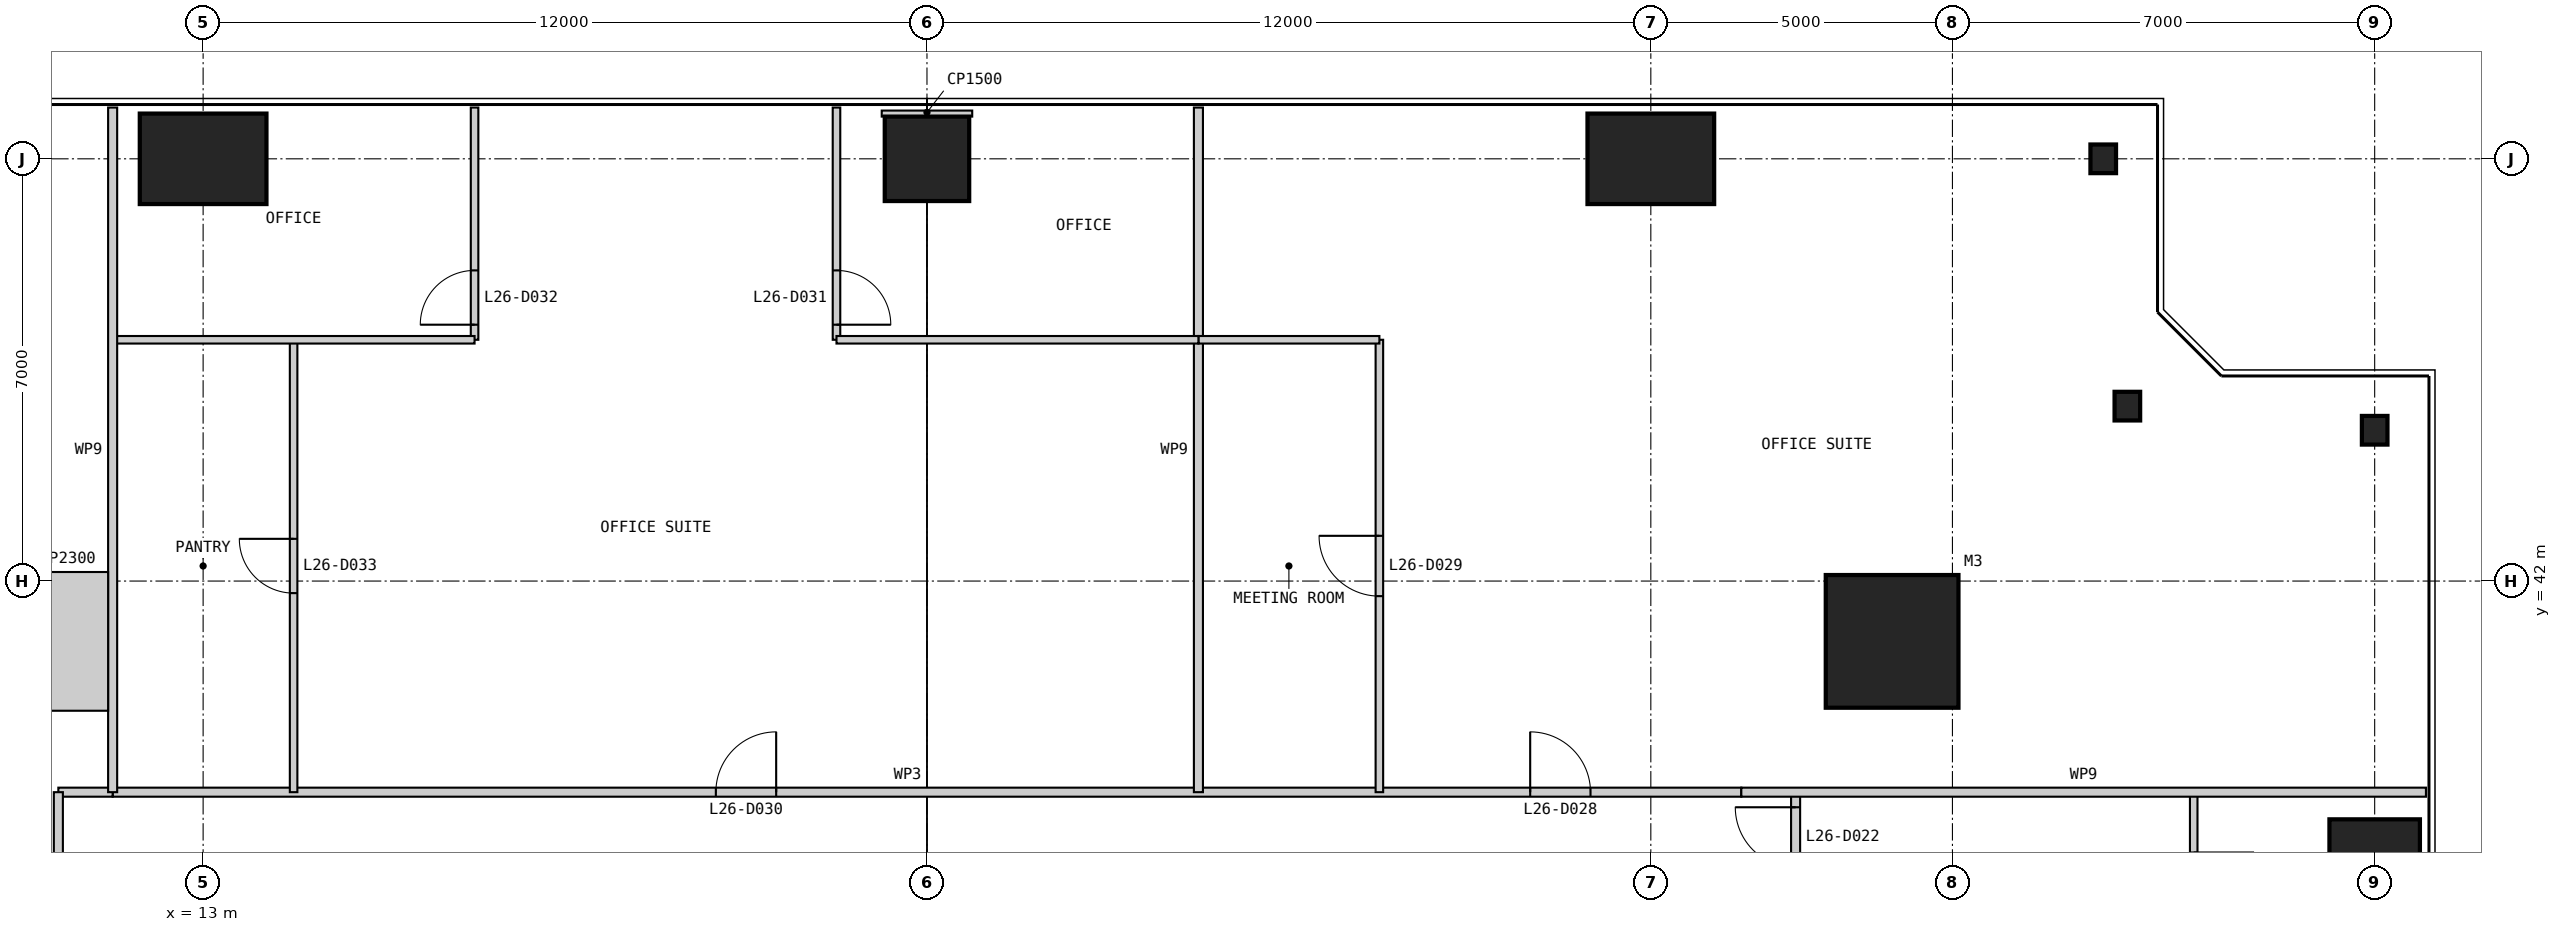
"""IFC4 building model, lengths in metres.
Left out: names, types, materials, properties, quantities, classifications, styles, units other than length and angle.
Written with IfcOpenShell. Run it as: python <this file> out.ifc"""

import sys

from ifc_helpers import new_model, si_unit, direction, frame, frame_2d, origin, origin_2d, place, context, subcontext, project, spatial, rectangle, i_section, extrude, element, fill, save


model = new_model("IFC4")
c1 = context("Model", 3, precision=1e-05, world=origin(), true_north=direction((0.0, 1.0)))
c2 = subcontext(c1, "Body", "Model", "MODEL_VIEW")
j1 = project(units=[si_unit("LENGTHUNIT", "METRE"), si_unit("PLANEANGLEUNIT", "RADIAN")], contexts=[c1])
p1 = place(None, origin())
s1 = spatial("IfcSite", under=j1, at=p1, CompositionType="ELEMENT")
p2 = place(p1, origin())
s2 = spatial("IfcBuilding", under=s1, at=p2, CompositionType="ELEMENT")
p3 = place(p2, frame((0.0, 0.0, 114.4)))
s3 = spatial("IfcBuildingStorey", under=s2, at=p3, CompositionType="ELEMENT", Elevation=114.4)
p4 = place(p3, frame((41.0, 41.0, 0.0), z_axis=(0.0, 0.0, 1.0), x_axis=(1.0, 0.0, 0.0)))
e1 = element("IfcColumn", 1, at=p4, inside=s3, PredefinedType="COLUMN", context=c2, shape_type="SweptSolid", body=[
    extrude(rectangle(XDim=2.2, YDim=2.2, at=origin_2d()), origin(), (0.0, 0.0, 1.0), 4.0),
])
p5 = place(p3, frame((49.0, 37.0, 0.0), z_axis=(0.0, 0.0, 1.0), x_axis=(1.0, 0.0, 0.0)))
e2 = element("IfcColumn", 2, at=p5, inside=s3, PredefinedType="COLUMN", context=c2, shape_type="SweptSolid", body=[
    extrude(rectangle(XDim=1.5, YDim=2.1, at=origin_2d()), origin(), (0.0, 0.0, 1.0), 4.0),
])
for number, where, z_axis, x_axis in (
    (3, (49.0, 44.5, 0.0), (0.0, 0.0, 1.0), (1.0, 0.0, 0.0)),
    (4, (44.9, 44.9, 0.0), (0.0, 0.0, 1.0), (1.0, 0.0, 0.0)),
    (5, (44.5, 49.0, 0.0), (0.0, 0.0, 1.0), (1.0, 0.0, 0.0)),
):
    element("IfcColumn", number, at=place(p3, frame(where, z_axis=z_axis, x_axis=x_axis)), inside=s3, PredefinedType="COLUMN", context=c2, shape_type="SweptSolid", body=[
        extrude(i_section(OverallWidth=0.424, OverallDepth=0.475, WebThickness=0.048, FlangeThickness=0.077, at=origin_2d()), origin(), (0.0, 0.0, 1.0), 4.0),
    ])
p6 = place(p3, frame((37.0, 49.0, 0.0), z_axis=(0.0, 0.0, 1.0), x_axis=(1.0, 0.0, 0.0)))
e6 = element("IfcColumn", 6, at=p6, inside=s3, PredefinedType="COLUMN", context=c2, shape_type="SweptSolid", body=[
    extrude(rectangle(XDim=2.1, YDim=1.5, at=origin_2d()), origin(), (0.0, 0.0, 1.0), 4.0),
])
p7 = place(p3, frame((25.0, 49.0, 0.0), z_axis=(0.0, 0.0, 1.0), x_axis=(1.0, 0.0, 0.0)))
e7 = element("IfcColumn", 7, at=p7, inside=s3, PredefinedType="COLUMN", context=c2, shape_type="SweptSolid", body=[
    extrude(rectangle(XDim=1.4, YDim=1.4, at=origin_2d()), origin(), (0.0, 0.0, 1.0), 4.0),
])
p8 = place(p3, frame((13.0, 49.0, 0.0), z_axis=(0.0, 0.0, 1.0), x_axis=(1.0, 0.0, 0.0)))
e8 = element("IfcColumn", 8, at=p8, inside=s3, PredefinedType="COLUMN", context=c2, shape_type="SweptSolid", body=[
    extrude(rectangle(XDim=2.1, YDim=1.5, at=origin_2d()), origin(), (0.0, 0.0, 1.0), 4.0),
])
p9 = place(p3, frame((39.4, 11.5, 0.0), z_axis=(0.0, 0.0, 1.0), x_axis=(0.0, 1.0, 0.0)))
e9 = element("IfcWall", 9, at=p9, inside=s3, PredefinedType="PARTITIONING", context=c2, shape_type="SweptSolid", body=[
    extrude(rectangle(XDim=27.0, YDim=0.15, at=frame_2d((13.5, 0.0))), origin(), (0.0, 0.0, 1.0), 3.85),
])
p10 = place(p9, frame((3.25, 0.0, 0.0)))
e10 = element("IfcOpeningElement", 10, at=p10, cuts=e9, PredefinedType="OPENING", context=c2, shape_type="SweptSolid", body=[
    extrude(rectangle(XDim=1.0, YDim=2.2, at=frame_2d((0.5, 1.1))), frame((0.0, 0.085, 0.0), z_axis=(0.0, -1.0, 0.0), x_axis=(1.0, 0.0, 0.0)), (0.0, 0.0, 1.0), 0.17),
])
p11 = place(p9, frame((25.75, 0.0, 0.0)))
e11 = element("IfcOpeningElement", 11, at=p11, cuts=e9, PredefinedType="OPENING", context=c2, shape_type="SweptSolid", body=[
    extrude(rectangle(XDim=1.0, YDim=2.2, at=frame_2d((0.5, 1.1))), frame((0.0, 0.085, 0.0), z_axis=(0.0, -1.0, 0.0), x_axis=(1.0, 0.0, 0.0)), (0.0, 0.0, 1.0), 0.17),
])
p12 = place(p9, frame((1.75, 0.0, 0.0)))
e12 = element("IfcOpeningElement", 12, at=p12, cuts=e9, PredefinedType="OPENING", context=c2, shape_type="SweptSolid", body=[
    extrude(rectangle(XDim=1.0, YDim=2.2, at=frame_2d((0.5, 1.1))), frame((0.0, 0.085, 0.0), z_axis=(0.0, -1.0, 0.0), x_axis=(1.0, 0.0, 0.0)), (0.0, 0.0, 1.0), 0.17),
])
p13 = place(p3, frame((46.0, 14.5, 0.0), z_axis=(0.0, 0.0, 1.0), x_axis=(0.0, 1.0, 0.0)))
e13 = element("IfcWall", 13, at=p13, inside=s3, PredefinedType="PARTITIONING", context=c2, shape_type="SweptSolid", body=[
    extrude(rectangle(XDim=24.0, YDim=0.125, at=frame_2d((12.0, 0.0))), origin(), (0.0, 0.0, 1.0), 3.238),
])
p14 = place(p13, frame((4.75, 0.0, 0.0)))
e14 = element("IfcOpeningElement", 14, at=p14, cuts=e13, PredefinedType="OPENING", context=c2, shape_type="SweptSolid", body=[
    extrude(rectangle(XDim=1.0, YDim=2.2, at=frame_2d((0.5, 1.1))), frame((0.0, 0.073, 0.0), z_axis=(0.0, -1.0, 0.0), x_axis=(1.0, 0.0, 0.0)), (0.0, 0.0, 1.0), 0.145),
])
p15 = place(p13, frame((10.0, 0.0, 0.0)))
e15 = element("IfcOpeningElement", 15, at=p15, cuts=e13, PredefinedType="OPENING", context=c2, shape_type="SweptSolid", body=[
    extrude(rectangle(XDim=1.0, YDim=2.2, at=frame_2d((0.5, 1.1))), frame((0.0, 0.073, 0.0), z_axis=(0.0, -1.0, 0.0), x_axis=(1.0, 0.0, 0.0)), (0.0, 0.0, 1.0), 0.145),
])
p16 = place(p13, frame((16.0, 0.0, 0.0)))
e16 = element("IfcOpeningElement", 16, at=p16, cuts=e13, PredefinedType="OPENING", context=c2, shape_type="SweptSolid", body=[
    extrude(rectangle(XDim=1.0, YDim=2.2, at=frame_2d((0.5, 1.1))), frame((0.0, 0.073, 0.0), z_axis=(0.0, -1.0, 0.0), x_axis=(1.0, 0.0, 0.0)), (0.0, 0.0, 1.0), 0.145),
])
p17 = place(p13, frame((22.0, 0.0, 0.0)))
e17 = element("IfcOpeningElement", 17, at=p17, cuts=e13, PredefinedType="OPENING", context=c2, shape_type="SweptSolid", body=[
    extrude(rectangle(XDim=1.0, YDim=2.2, at=frame_2d((0.5, 1.1))), frame((0.0, 0.073, 0.0), z_axis=(0.0, -1.0, 0.0), x_axis=(1.0, 0.0, 0.0)), (0.0, 0.0, 1.0), 0.145),
])
p18 = place(p3, frame((38.5, 38.5, 0.0), z_axis=(0.0, 0.0, 1.0), x_axis=(-1.0, 0.0, 0.0)))
e18 = element("IfcWall", 18, at=p18, inside=s3, PredefinedType="PARTITIONING", context=c2, shape_type="SweptSolid", body=[
    extrude(rectangle(XDim=27.0, YDim=0.15, at=frame_2d((13.5, 0.0))), origin(), (0.0, 0.0, 1.0), 3.85),
])
p19 = place(p18, frame((2.5, 0.0, 0.0)))
e19 = element("IfcOpeningElement", 19, at=p19, cuts=e18, PredefinedType="OPENING", context=c2, shape_type="SweptSolid", body=[
    extrude(rectangle(XDim=1.0, YDim=2.2, at=frame_2d((0.5, 1.1))), frame((0.0, 0.085, 0.0), z_axis=(0.0, -1.0, 0.0), x_axis=(1.0, 0.0, 0.0)), (0.0, 0.0, 1.0), 0.17),
])
p20 = place(p18, frame((16.0, 0.0, 0.0)))
e20 = element("IfcOpeningElement", 20, at=p20, cuts=e18, PredefinedType="OPENING", context=c2, shape_type="SweptSolid", body=[
    extrude(rectangle(XDim=1.0, YDim=2.2, at=frame_2d((0.5, 1.1))), frame((0.0, 0.085, 0.0), z_axis=(0.0, -1.0, 0.0), x_axis=(1.0, 0.0, 0.0)), (0.0, 0.0, 1.0), 0.17),
])
p21 = place(p3, frame((49.85, 38.5, 0.0), z_axis=(0.0, 0.0, 1.0), x_axis=(-1.0, 0.0, 0.0)))
e21 = element("IfcWall", 21, at=p21, inside=s3, PredefinedType="PARTITIONING", context=c2, shape_type="SweptSolid", body=[
    extrude(rectangle(XDim=11.35, YDim=0.15, at=frame_2d((5.675, 0.0))), origin(), (0.0, 0.0, 1.0), 3.85),
])
p22 = place(p3, frame((32.5, 46.0, 0.0), z_axis=(0.0, 0.0, 1.0), x_axis=(0.0, -1.0, 0.0)))
e22 = element("IfcWall", 22, at=p22, inside=s3, PredefinedType="PARTITIONING", context=c2, shape_type="SweptSolid", body=[
    extrude(rectangle(XDim=7.5, YDim=0.125, at=frame_2d((3.75, 0.0))), origin(), (0.0, 0.0, 1.0), 3.85),
])
p23 = place(p22, frame((3.25, 0.0, 0.0)))
e23 = element("IfcOpeningElement", 23, at=p23, cuts=e22, PredefinedType="OPENING", context=c2, shape_type="SweptSolid", body=[
    extrude(rectangle(XDim=1.0, YDim=2.2, at=frame_2d((0.5, 1.1))), frame((0.0, 0.073, 0.0), z_axis=(0.0, -1.0, 0.0), x_axis=(1.0, 0.0, 0.0)), (0.0, 0.0, 1.0), 0.145),
])
p24 = place(p3, frame((29.5, 49.85, 0.0), z_axis=(0.0, 0.0, 1.0), x_axis=(0.0, -1.0, 0.0)))
e24 = element("IfcWall", 24, at=p24, inside=s3, PredefinedType="PARTITIONING", context=c2, shape_type="SweptSolid", body=[
    extrude(rectangle(XDim=11.35, YDim=0.15, at=frame_2d((5.675, 0.0))), origin(), (0.0, 0.0, 1.0), 3.85),
])
p25 = place(p3, frame((23.5, 49.85, 0.0), z_axis=(0.0, 0.0, 1.0), x_axis=(0.0, -1.0, 0.0)))
e25 = element("IfcWall", 25, at=p25, inside=s3, PredefinedType="PARTITIONING", context=c2, shape_type="SweptSolid", body=[
    extrude(rectangle(XDim=3.85, YDim=0.125, at=frame_2d((1.925, 0.0))), origin(), (0.0, 0.0, 1.0), 3.85),
])
p26 = place(p25, frame((2.7, 0.0, 0.0)))
e26 = element("IfcOpeningElement", 26, at=p26, cuts=e25, PredefinedType="OPENING", context=c2, shape_type="SweptSolid", body=[
    extrude(rectangle(XDim=0.9, YDim=2.2, at=frame_2d((0.45, 1.1))), frame((0.0, 0.073, 0.0), z_axis=(0.0, -1.0, 0.0), x_axis=(1.0, 0.0, 0.0)), (0.0, 0.0, 1.0), 0.145),
])
p27 = place(p3, frame((17.5, 49.85, 0.0), z_axis=(0.0, 0.0, 1.0), x_axis=(0.0, -1.0, 0.0)))
e27 = element("IfcWall", 27, at=p27, inside=s3, PredefinedType="PARTITIONING", context=c2, shape_type="SweptSolid", body=[
    extrude(rectangle(XDim=3.85, YDim=0.125, at=frame_2d((1.925, 0.0))), origin(), (0.0, 0.0, 1.0), 3.85),
])
p28 = place(p27, frame((2.7, 0.0, 0.0)))
e28 = element("IfcOpeningElement", 28, at=p28, cuts=e27, PredefinedType="OPENING", context=c2, shape_type="SweptSolid", body=[
    extrude(rectangle(XDim=0.9, YDim=2.2, at=frame_2d((0.45, 1.1))), frame((0.0, 0.073, 0.0), z_axis=(0.0, -1.0, 0.0), x_axis=(1.0, 0.0, 0.0)), (0.0, 0.0, 1.0), 0.145),
])
p29 = place(p3, frame((14.5, 46.0, 0.0), z_axis=(0.0, 0.0, 1.0), x_axis=(0.0, -1.0, 0.0)))
e29 = element("IfcWall", 29, at=p29, inside=s3, PredefinedType="PARTITIONING", context=c2, shape_type="SweptSolid", body=[
    extrude(rectangle(XDim=7.5, YDim=0.125, at=frame_2d((3.75, 0.0))), origin(), (0.0, 0.0, 1.0), 3.85),
])
p30 = place(p29, frame((3.3, 0.0, 0.0)))
e30 = element("IfcOpeningElement", 30, at=p30, cuts=e29, PredefinedType="OPENING", context=c2, shape_type="SweptSolid", body=[
    extrude(rectangle(XDim=0.9, YDim=2.2, at=frame_2d((0.45, 1.1))), frame((0.0, 0.073, 0.0), z_axis=(0.0, -1.0, 0.0), x_axis=(1.0, 0.0, 0.0)), (0.0, 0.0, 1.0), 0.145),
])
p31 = place(p3, frame((32.5, 46.0, 0.0), z_axis=(0.0, 0.0, 1.0), x_axis=(-1.0, 0.0, 0.0)))
e31 = element("IfcWall", 31, at=p31, inside=s3, PredefinedType="PARTITIONING", context=c2, shape_type="SweptSolid", body=[
    extrude(rectangle(XDim=3.0, YDim=0.125, at=frame_2d((1.5, 0.0))), origin(), (0.0, 0.0, 1.0), 3.85),
])
for number, where, z_axis, x_axis in (
    (32, (29.5, 46.0, 0.0), (0.0, 0.0, 1.0), (-1.0, 0.0, 0.0)),
    (33, (17.5, 46.0, 0.0), (0.0, 0.0, 1.0), (-1.0, 0.0, 0.0)),
):
    element("IfcWall", number, at=place(p3, frame(where, z_axis=z_axis, x_axis=x_axis)), inside=s3, PredefinedType="PARTITIONING", context=c2, shape_type="SweptSolid", body=[
        extrude(rectangle(XDim=6.0, YDim=0.125, at=frame_2d((3.0, 0.0))), origin(), (0.0, 0.0, 1.0), 3.85),
    ])
p32 = place(p3, frame((11.5, 38.5, 0.0), z_axis=(0.0, 0.0, 1.0), x_axis=(-1.0, 0.0, 0.0)))
e34 = element("IfcWall", 34, at=p32, inside=s3, PredefinedType="PARTITIONING", context=c2, shape_type="SweptSolid", body=[
    extrude(rectangle(XDim=0.9, YDim=0.15, at=frame_2d((0.45, 0.0))), origin(), (0.0, 0.0, 1.0), 3.85),
])
p33 = place(p3, frame((10.6, 38.5, 0.0), z_axis=(0.0, 0.0, 1.0), x_axis=(0.0, -1.0, 0.0)))
e35 = element("IfcWall", 35, at=p33, inside=s3, PredefinedType="PARTITIONING", context=c2, shape_type="SweptSolid", body=[
    extrude(rectangle(XDim=27.0, YDim=0.15, at=frame_2d((13.5, 0.0))), origin(), (0.0, 0.0, 1.0), 3.85),
])
p34 = place(p33, frame((3.25, 0.0, 0.0)))
e36 = element("IfcOpeningElement", 36, at=p34, cuts=e35, PredefinedType="OPENING", context=c2, shape_type="SweptSolid", body=[
    extrude(rectangle(XDim=1.0, YDim=2.2, at=frame_2d((0.5, 1.1))), frame((0.0, 0.085, 0.0), z_axis=(0.0, -1.0, 0.0), x_axis=(1.0, 0.0, 0.0)), (0.0, 0.0, 1.0), 0.17),
])
p35 = place(p33, frame((22.75, 0.0, 0.0)))
e37 = element("IfcOpeningElement", 37, at=p35, cuts=e35, PredefinedType="OPENING", context=c2, shape_type="SweptSolid", body=[
    extrude(rectangle(XDim=1.0, YDim=2.2, at=frame_2d((0.5, 1.1))), frame((0.0, 0.085, 0.0), z_axis=(0.0, -1.0, 0.0), x_axis=(1.0, 0.0, 0.0)), (0.0, 0.0, 1.0), 0.17),
])
p36 = place(p3, frame((11.5, 49.85, 0.0), z_axis=(0.0, 0.0, 1.0), x_axis=(0.0, -1.0, 0.0)))
e38 = element("IfcWall", 38, at=p36, inside=s3, PredefinedType="PARTITIONING", context=c2, shape_type="SweptSolid", body=[
    extrude(rectangle(XDim=11.35, YDim=0.15, at=frame_2d((5.675, 0.0))), origin(), (0.0, 0.0, 1.0), 3.85),
])
p37 = place(p3, frame((25.0, 49.8, 0.0), z_axis=(0.0, 0.0, 1.0), x_axis=(0.0, -1.0, 0.0)))
e39 = element("IfcWall", 39, at=p37, inside=s3, PredefinedType="PARTITIONING", context=c2, shape_type="SweptSolid", body=[
    extrude(rectangle(XDim=0.1, YDim=1.5, at=frame_2d((0.05, 0.0))), origin(), (0.0, 0.0, 1.0), 3.85),
])
p38 = place(p3, frame((11.425, 41.0, 0.0), z_axis=(0.0, 0.0, 1.0), x_axis=(-1.0, 0.0, 0.0)))
e40 = element("IfcWall", 40, at=p38, inside=s3, PredefinedType="PARTITIONING", context=c2, shape_type="SweptSolid", body=[
    extrude(rectangle(XDim=1.325, YDim=2.3, at=frame_2d((0.663, 0.0))), origin(), (0.0, 0.0, 1.0), 3.85),
])
p39 = place(p11, origin())
e41 = element("IfcDoor", 41, at=p39, inside=s3, OperationType="SINGLE_SWING_RIGHT", PredefinedType="DOOR", context=c2, shape_type="SweptSolid", body=[
    extrude(rectangle(XDim=1.0, YDim=2.2, at=frame_2d((0.5, 1.1))), frame((0.0, 0.025, 0.0), z_axis=(0.0, -1.0, 0.0), x_axis=(1.0, 0.0, 0.0)), (0.0, 0.0, 1.0), 0.05),
])
fill(e11, e41)
p40 = place(p19, frame((1.0, 0.0, 0.0), z_axis=(0.0, 0.0, 1.0), x_axis=(-1.0, 0.0, 0.0)))
e42 = element("IfcDoor", 42, at=p40, inside=s3, OperationType="SINGLE_SWING_LEFT", PredefinedType="DOOR", context=c2, shape_type="SweptSolid", body=[
    extrude(rectangle(XDim=1.0, YDim=2.2, at=frame_2d((0.5, 1.1))), frame((0.0, 0.025, 0.0), z_axis=(0.0, -1.0, 0.0), x_axis=(1.0, 0.0, 0.0)), (0.0, 0.0, 1.0), 0.05),
])
fill(e19, e42)
p41 = place(p23, frame((1.0, 0.0, 0.0), z_axis=(0.0, 0.0, 1.0), x_axis=(-1.0, 0.0, 0.0)))
e43 = element("IfcDoor", 43, at=p41, inside=s3, OperationType="SINGLE_SWING_RIGHT", PredefinedType="DOOR", context=c2, shape_type="SweptSolid", body=[
    extrude(rectangle(XDim=1.0, YDim=2.2, at=frame_2d((0.5, 1.1))), frame((0.0, 0.025, 0.0), z_axis=(0.0, -1.0, 0.0), x_axis=(1.0, 0.0, 0.0)), (0.0, 0.0, 1.0), 0.05),
])
fill(e23, e43)
p42 = place(p20, frame((1.0, 0.0, 0.0), z_axis=(0.0, 0.0, 1.0), x_axis=(-1.0, 0.0, 0.0)))
e44 = element("IfcDoor", 44, at=p42, inside=s3, OperationType="SINGLE_SWING_RIGHT", PredefinedType="DOOR", context=c2, shape_type="SweptSolid", body=[
    extrude(rectangle(XDim=1.0, YDim=2.2, at=frame_2d((0.5, 1.1))), frame((0.0, 0.025, 0.0), z_axis=(0.0, -1.0, 0.0), x_axis=(1.0, 0.0, 0.0)), (0.0, 0.0, 1.0), 0.05),
])
fill(e20, e44)
p43 = place(p26, origin())
e45 = element("IfcDoor", 45, at=p43, inside=s3, OperationType="SINGLE_SWING_RIGHT", PredefinedType="DOOR", context=c2, shape_type="SweptSolid", body=[
    extrude(rectangle(XDim=0.9, YDim=2.2, at=frame_2d((0.45, 1.1))), frame((0.0, 0.025, 0.0), z_axis=(0.0, -1.0, 0.0), x_axis=(1.0, 0.0, 0.0)), (0.0, 0.0, 1.0), 0.05),
])
fill(e26, e45)
p44 = place(p28, frame((0.9, 0.0, 0.0), z_axis=(0.0, 0.0, 1.0), x_axis=(-1.0, 0.0, 0.0)))
e46 = element("IfcDoor", 46, at=p44, inside=s3, OperationType="SINGLE_SWING_LEFT", PredefinedType="DOOR", context=c2, shape_type="SweptSolid", body=[
    extrude(rectangle(XDim=0.9, YDim=2.2, at=frame_2d((0.45, 1.1))), frame((0.0, 0.025, 0.0), z_axis=(0.0, -1.0, 0.0), x_axis=(1.0, 0.0, 0.0)), (0.0, 0.0, 1.0), 0.05),
])
fill(e28, e46)
p45 = place(p30, frame((0.9, 0.0, 0.0), z_axis=(0.0, 0.0, 1.0), x_axis=(-1.0, 0.0, 0.0)))
e47 = element("IfcDoor", 47, at=p45, inside=s3, OperationType="SINGLE_SWING_RIGHT", PredefinedType="DOOR", context=c2, shape_type="SweptSolid", body=[
    extrude(rectangle(XDim=0.9, YDim=2.2, at=frame_2d((0.45, 1.1))), frame((0.0, 0.025, 0.0), z_axis=(0.0, -1.0, 0.0), x_axis=(1.0, 0.0, 0.0)), (0.0, 0.0, 1.0), 0.05),
])
fill(e30, e47)
save(model, sys.argv[1])
